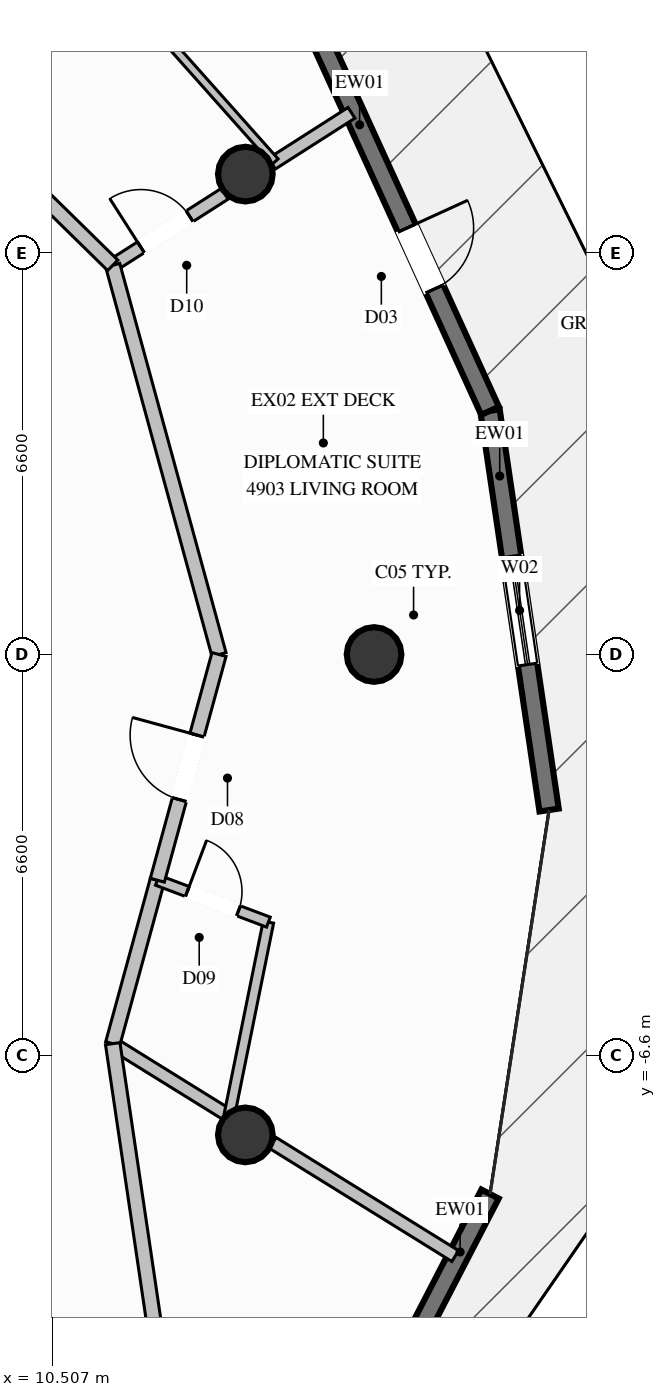
"""IFC4 building model, lengths in metres.
Left out: names, types, materials, properties, quantities, classifications, styles, units other than length and angle.
Written with IfcOpenShell. Run it as: python <this file> out.ifc"""

import sys

from ifc_helpers import new_model, si_unit, direction, frame, frame_2d, origin, origin_2d, place, context, subcontext, project, spatial, rectangle, circle, extrude, element, fill, save


model = new_model("IFC4")
c1 = context("Model", 3, precision=1e-05, world=origin(), true_north=direction((0.0, 1.0)))
c2 = subcontext(c1, "Body", "Model", "MODEL_VIEW")
j1 = project(units=[si_unit("LENGTHUNIT", "METRE"), si_unit("PLANEANGLEUNIT", "RADIAN")], contexts=[c1])
p1 = place(None, origin())
s1 = spatial("IfcSite", under=j1, at=p1, CompositionType="ELEMENT")
p2 = place(p1, origin())
s2 = spatial("IfcBuilding", under=s1, at=p2, CompositionType="ELEMENT")
p3 = place(p2, frame((0.0, 0.0, 184.0)))
s3 = spatial("IfcBuildingStorey", under=s2, at=p3, CompositionType="ELEMENT", Elevation=184.0)
for number, where, z_axis, x_axis in (
    (1, (15.8, 0.0, 0.0), (0.0, 0.0, 1.0), (1.0, 0.0, 0.0)),
    (2, (13.683, 7.9, 0.0), (0.0, 0.0, 1.0), (1.0, 0.0, 0.0)),
    (3, (13.683, -7.9, 0.0), (0.0, 0.0, 1.0), (1.0, 0.0, 0.0)),
):
    element("IfcColumn", number, at=place(p3, frame(where, z_axis=z_axis, x_axis=x_axis)), inside=s3, PredefinedType="COLUMN", context=c2, shape_type="SweptSolid", body=[
        extrude(circle(Radius=0.45, at=origin_2d()), origin(), (0.0, 0.0, 1.0), 3.6),
    ])
p4 = place(p3, frame((17.708, -8.873, 0.0), z_axis=(0.0, 0.0, 1.0), x_axis=(-0.459419669187, -0.888219324021, 0.0)))
e4 = element("IfcWall", 4, at=p4, inside=s3, PredefinedType="SOLIDWALL", context=c2, shape_type="SweptSolid", body=[
    extrude(rectangle(XDim=6.131, YDim=0.32, at=frame_2d((3.066, 0.0))), origin(), (0.0, 0.0, 1.0), 3.36),
])
p5 = place(p4, frame((2.395, 0.0, 0.35)))
e5 = element("IfcOpeningElement", 5, at=p5, cuts=e4, PredefinedType="OPENING", context=c2, shape_type="SweptSolid", body=[
    extrude(rectangle(XDim=1.8, YDim=2.6, at=frame_2d((0.9, 1.3))), frame((0.0, 0.17, 0.0), z_axis=(0.0, -1.0, 0.0), x_axis=(1.0, 0.0, 0.0)), (0.0, 0.0, 1.0), 0.34),
])
p6 = place(p3, frame((17.708, 4.008, 0.0), z_axis=(0.0, 0.0, 1.0), x_axis=(0.146280717265, -0.989243120652, 0.0)))
e6 = element("IfcWall", 6, at=p6, inside=s3, PredefinedType="SOLIDWALL", context=c2, shape_type="SweptSolid", body=[
    extrude(rectangle(XDim=6.637, YDim=0.32, at=frame_2d((3.319, 0.0))), origin(), (0.0, 0.0, 1.0), 3.36),
])
p7 = place(p6, frame((2.419, 0.0, 0.35)))
e7 = element("IfcOpeningElement", 7, at=p7, cuts=e6, PredefinedType="OPENING", context=c2, shape_type="SweptSolid", body=[
    extrude(rectangle(XDim=1.8, YDim=2.6, at=frame_2d((0.9, 1.3))), frame((0.0, 0.17, 0.0), z_axis=(0.0, -1.0, 0.0), x_axis=(1.0, 0.0, 0.0)), (0.0, 0.0, 1.0), 0.34),
])
p8 = place(p3, frame((14.892, 10.181, 0.0), z_axis=(0.0, 0.0, 1.0), x_axis=(0.415033398102, -0.909806176314, 0.0)))
e8 = element("IfcWall", 8, at=p8, inside=s3, PredefinedType="SOLIDWALL", context=c2, shape_type="SweptSolid", body=[
    extrude(rectangle(XDim=6.785, YDim=0.32, at=frame_2d((3.393, 0.0))), origin(), (0.0, 0.0, 1.0), 3.36),
])
p9 = place(p8, frame((3.483, 0.0, 0.0)))
e9 = element("IfcOpeningElement", 9, at=p9, cuts=e8, PredefinedType="OPENING", context=c2, shape_type="SweptSolid", body=[
    extrude(rectangle(XDim=1.1, YDim=2.2, at=frame_2d((0.55, 1.1))), frame((0.0, 0.17, 0.0), z_axis=(0.0, -1.0, 0.0), x_axis=(1.0, 0.0, 0.0)), (0.0, 0.0, 1.0), 0.34),
])
p10 = place(p3, frame((11.502, 6.4, 0.0), z_axis=(0.0, 0.0, 1.0), x_axis=(0.842739917801, 0.538320936752, 0.0)))
e10 = element("IfcWall", 10, at=p10, inside=s3, PredefinedType="PARTITIONING", context=c2, shape_type="SweptSolid", body=[
    extrude(rectangle(XDim=2.185, YDim=0.21, at=frame_2d((1.092, 0.0))), origin(), (0.0, 0.0, 1.0), 2.877),
])
p11 = place(p10, frame((0.55, 0.0, 0.0)))
e11 = element("IfcOpeningElement", 11, at=p11, cuts=e10, PredefinedType="OPENING", context=c2, shape_type="SweptSolid", body=[
    extrude(rectangle(XDim=0.95, YDim=2.1, at=frame_2d((0.475, 1.05))), frame((0.0, 0.115, 0.0), z_axis=(0.0, -1.0, 0.0), x_axis=(1.0, 0.0, 0.0)), (0.0, 0.0, 1.0), 0.23),
])
p12 = place(p3, frame((14.12, 8.072, 0.0), z_axis=(0.0, 0.0, 1.0), x_axis=(0.84277351824, 0.538268331739, 0.0)))
e12 = element("IfcWall", 12, at=p12, inside=s3, PredefinedType="PARTITIONING", context=c2, shape_type="SweptSolid", body=[
    extrude(rectangle(XDim=1.553, YDim=0.21, at=frame_2d((0.776, 0.0))), origin(), (0.0, 0.0, 1.0), 3.36),
])
p13 = place(p3, frame((11.502, -6.4, 0.0), z_axis=(0.0, 0.0, 1.0), x_axis=(0.849789901528, -0.527121545054, 0.0)))
e13 = element("IfcWall", 13, at=p13, inside=s3, PredefinedType="PARTITIONING", context=c2, shape_type="SweptSolid", body=[
    extrude(rectangle(XDim=2.191, YDim=0.21, at=frame_2d((1.096, 0.0))), origin(), (0.0, 0.0, 1.0), 2.877),
])
p14 = place(p3, frame((14.134, -8.032, 0.0), z_axis=(0.0, 0.0, 1.0), x_axis=(0.849841998218, -0.527037549009, 0.0)))
e14 = element("IfcWall", 14, at=p14, inside=s3, PredefinedType="PARTITIONING", context=c2, shape_type="SweptSolid", body=[
    extrude(rectangle(XDim=3.531, YDim=0.21, at=frame_2d((1.766, 0.0))), origin(), (0.0, 0.0, 1.0), 3.36),
])
p15 = place(p3, frame((11.502, -6.4, 0.0), z_axis=(0.0, 0.0, 1.0), x_axis=(0.263465836707, 0.964668727019, 0.0)))
e15 = element("IfcWall", 15, at=p15, inside=s3, PredefinedType="PARTITIONING", context=c2, shape_type="SweptSolid", body=[
    extrude(rectangle(XDim=2.786, YDim=0.24, at=frame_2d((1.393, 0.0))), origin(), (0.0, 0.0, 1.0), 3.36),
])
p16 = place(p3, frame((13.417, -7.588, 0.0), z_axis=(0.0, 0.0, 1.0), x_axis=(0.198368094192, 0.98012759333, 0.0)))
e16 = element("IfcWall", 16, at=p16, inside=s3, PredefinedType="PLUMBINGWALL", context=c2, shape_type="SweptSolid", body=[
    extrude(rectangle(XDim=3.252, YDim=0.175, at=frame_2d((1.626, 0.0))), origin(), (0.0, 0.0, 1.0), 2.929),
])
p17 = place(p3, frame((12.236, -3.712, 0.0), z_axis=(0.0, 0.0, 1.0), x_axis=(0.935612633934, -0.353028326375, 0.0)))
e17 = element("IfcWall", 17, at=p17, inside=s3, PredefinedType="PLUMBINGWALL", context=c2, shape_type="SweptSolid", body=[
    extrude(rectangle(XDim=1.952, YDim=0.175, at=frame_2d((0.976, 0.0))), origin(), (0.0, 0.0, 1.0), 3.36),
])
p18 = place(p17, frame((0.526, 0.0, 0.0)))
e18 = element("IfcOpeningElement", 18, at=p18, cuts=e17, PredefinedType="OPENING", context=c2, shape_type="SweptSolid", body=[
    extrude(rectangle(XDim=0.9, YDim=2.1, at=frame_2d((0.45, 1.05))), frame((0.0, 0.098, 0.0), z_axis=(0.0, -1.0, 0.0), x_axis=(1.0, 0.0, 0.0)), (0.0, 0.0, 1.0), 0.195),
])
p19 = place(p3, frame((13.25, 0.0, 0.0), z_axis=(0.0, 0.0, 1.0), x_axis=(-0.263484816116, 0.96466354325, 0.0)))
e19 = element("IfcWall", 19, at=p19, inside=s3, PredefinedType="PARTITIONING", context=c2, shape_type="SweptSolid", body=[
    extrude(rectangle(XDim=6.634, YDim=0.24, at=frame_2d((3.317, 0.0))), origin(), (0.0, 0.0, 1.0), 3.36),
])
p20 = place(p3, frame((12.236, -3.712, 0.0), z_axis=(0.0, 0.0, 1.0), x_axis=(0.263498559894, 0.964659789218, 0.0)))
e20 = element("IfcWall", 20, at=p20, inside=s3, PredefinedType="PARTITIONING", context=c2, shape_type="SweptSolid", body=[
    extrude(rectangle(XDim=3.848, YDim=0.24, at=frame_2d((1.924, 0.0))), origin(), (0.0, 0.0, 1.0), 3.36),
])
p21 = place(p20, frame((1.374, 0.0, 0.0)))
e21 = element("IfcOpeningElement", 21, at=p21, cuts=e20, PredefinedType="OPENING", context=c2, shape_type="SweptSolid", body=[
    extrude(rectangle(XDim=1.1, YDim=2.3, at=frame_2d((0.55, 1.15))), frame((0.0, 0.13, 0.0), z_axis=(0.0, -1.0, 0.0), x_axis=(1.0, 0.0, 0.0)), (0.0, 0.0, 1.0), 0.26),
])
p22 = place(p3, frame((11.502, 6.4, 0.0), z_axis=(0.0, 0.0, 1.0), x_axis=(-0.713933337596, 0.700213674152, 0.0)))
e22 = element("IfcWall", 22, at=p22, inside=s3, PredefinedType="PARTITIONING", context=c2, shape_type="SweptSolid", body=[
    extrude(rectangle(XDim=6.691, YDim=0.24, at=frame_2d((3.345, 0.0))), origin(), (0.0, 0.0, 1.0), 3.36),
])
p23 = place(p3, frame((14.172, 8.105, 0.0), z_axis=(0.0, 0.0, 1.0), x_axis=(-0.664942198266, 0.74689482055, 0.0)))
e23 = element("IfcWall", 23, at=p23, inside=s3, PredefinedType="PARTITIONING", context=c2, shape_type="SweptSolid", body=[
    extrude(rectangle(XDim=8.565, YDim=0.135, at=frame_2d((4.282, 0.0))), origin(), (0.0, 0.0, 1.0), 2.929),
])
p24 = place(p23, frame((3.807, 0.0, 0.0)))
e24 = element("IfcOpeningElement", 24, at=p24, cuts=e23, PredefinedType="OPENING", context=c2, shape_type="SweptSolid", body=[
    extrude(rectangle(XDim=0.95, YDim=2.1, at=frame_2d((0.475, 1.05))), frame((0.0, 0.078, 0.0), z_axis=(0.0, -1.0, 0.0), x_axis=(1.0, 0.0, 0.0)), (0.0, 0.0, 1.0), 0.155),
])
p25 = place(p3, frame((12.3, -11.8, 0.0), z_axis=(0.0, 0.0, 1.0), x_axis=(-0.146203405363, 0.98925454978, 0.0)))
e25 = element("IfcWall", 25, at=p25, inside=s3, PredefinedType="PARTITIONING", context=c2, shape_type="SweptSolid", body=[
    extrude(rectangle(XDim=5.459, YDim=0.24, at=frame_2d((2.729, 0.0))), origin(), (0.0, 0.0, 1.0), 3.36),
])
p26 = place(p7, origin())
e26 = element("IfcWindow", 26, at=p26, inside=s3, PartitioningType="SINGLE_PANEL", PredefinedType="WINDOW", context=c2, shape_type="SweptSolid", body=[
    extrude(rectangle(XDim=1.8, YDim=2.6, at=frame_2d((0.9, 1.3))), frame((0.0, 0.03, 0.0), z_axis=(0.0, -1.0, 0.0), x_axis=(1.0, 0.0, 0.0)), (0.0, 0.0, 1.0), 0.06),
])
fill(e7, e26)
p27 = place(p9, origin())
e27 = element("IfcDoor", 27, at=p27, inside=s3, OperationType="SINGLE_SWING_LEFT", PredefinedType="DOOR", context=c2, shape_type="SweptSolid", body=[
    extrude(rectangle(XDim=1.1, YDim=2.2, at=frame_2d((0.55, 1.1))), frame((0.0, 0.025, 0.0), z_axis=(0.0, -1.0, 0.0), x_axis=(1.0, 0.0, 0.0)), (0.0, 0.0, 1.0), 0.05),
])
fill(e9, e27)
p28 = place(p18, origin())
e28 = element("IfcDoor", 28, at=p28, inside=s3, OperationType="SINGLE_SWING_LEFT", PredefinedType="DOOR", context=c2, shape_type="SweptSolid", body=[
    extrude(rectangle(XDim=0.9, YDim=2.1, at=frame_2d((0.45, 1.05))), frame((0.0, 0.025, 0.0), z_axis=(0.0, -1.0, 0.0), x_axis=(1.0, 0.0, 0.0)), (0.0, 0.0, 1.0), 0.05),
])
fill(e18, e28)
p29 = place(p21, origin())
e29 = element("IfcDoor", 29, at=p29, inside=s3, OperationType="SINGLE_SWING_RIGHT", PredefinedType="DOOR", context=c2, shape_type="SweptSolid", body=[
    extrude(rectangle(XDim=1.1, YDim=2.3, at=frame_2d((0.55, 1.15))), frame((0.0, 0.025, 0.0), z_axis=(0.0, -1.0, 0.0), x_axis=(1.0, 0.0, 0.0)), (0.0, 0.0, 1.0), 0.05),
])
fill(e21, e29)
p30 = place(p11, origin())
e30 = element("IfcDoor", 30, at=p30, inside=s3, OperationType="SINGLE_SWING_LEFT", PredefinedType="DOOR", context=c2, shape_type="SweptSolid", body=[
    extrude(rectangle(XDim=0.95, YDim=2.1, at=frame_2d((0.475, 1.05))), frame((0.0, 0.025, 0.0), z_axis=(0.0, -1.0, 0.0), x_axis=(1.0, 0.0, 0.0)), (0.0, 0.0, 1.0), 0.05),
])
fill(e11, e30)
save(model, sys.argv[1])
